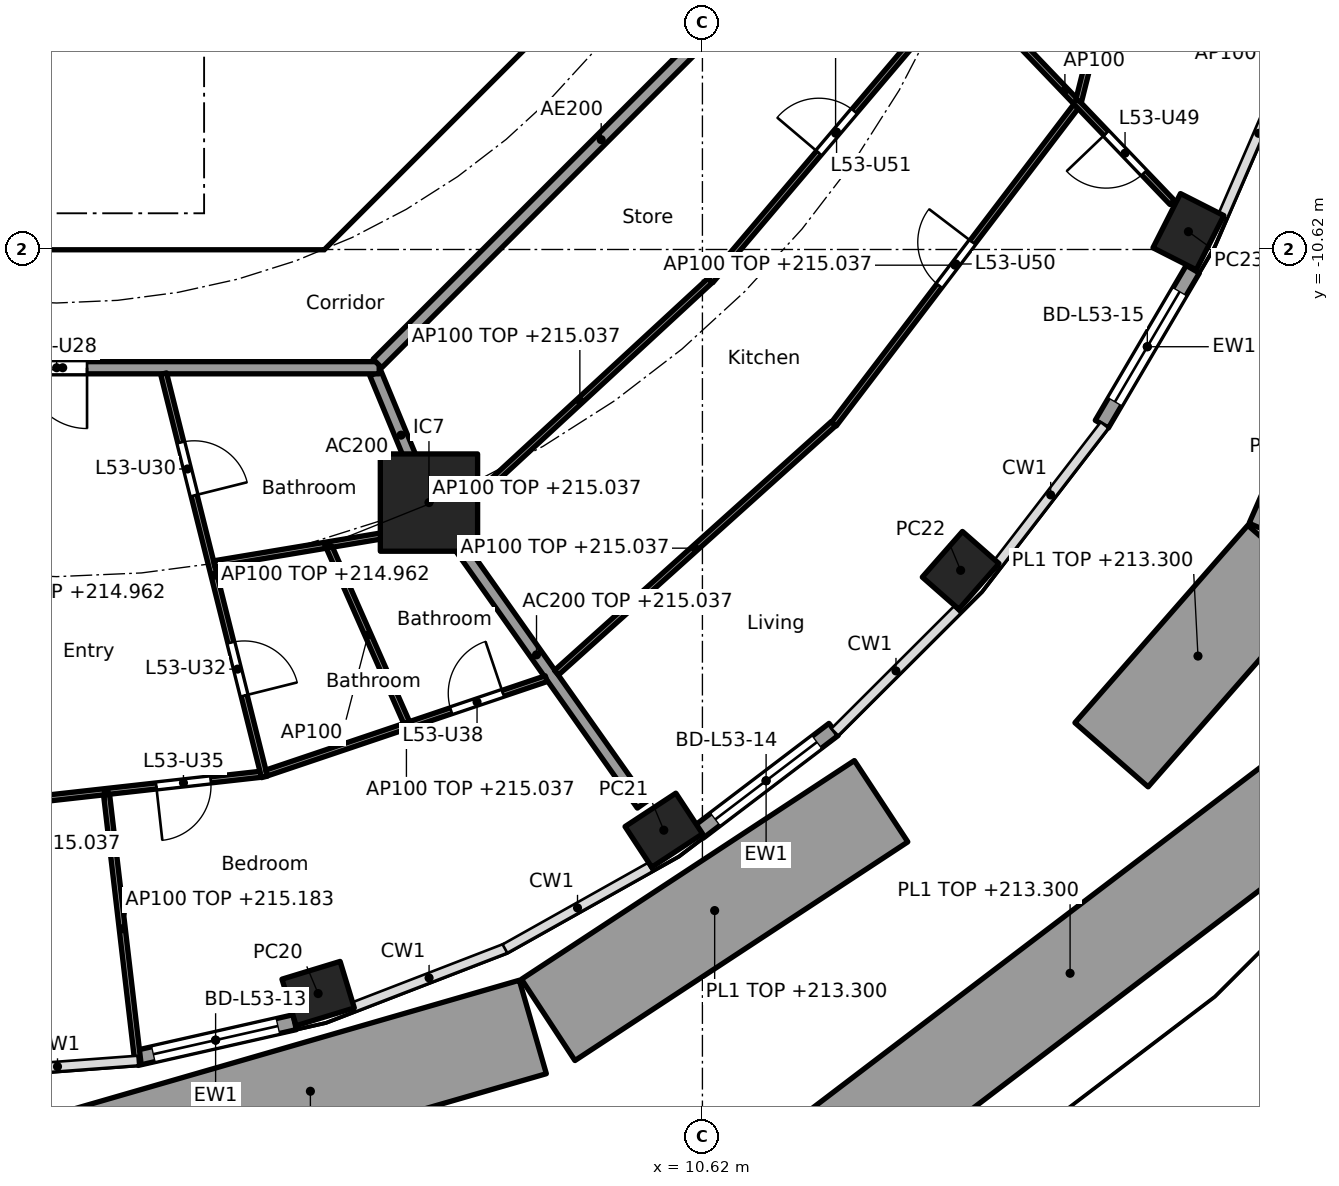
"""IFC4 building model, lengths in metres.
Left out: names, types, materials, properties, quantities, classifications, styles, units other than length and angle.
Written with IfcOpenShell. Run it as: python <this file> out.ifc"""

import sys

from ifc_helpers import new_model, si_unit, direction, frame, frame_2d, origin, origin_2d, place, context, subcontext, project, spatial, polyline, rectangle, hollow_rectangle, outline, extrude, element, fill, save


model = new_model("IFC4")
c1 = context("Model", 3, precision=1e-05, world=origin(), true_north=direction((0.0, 1.0)))
c2 = subcontext(c1, "Body", "Model", "MODEL_VIEW")
j1 = project(units=[si_unit("LENGTHUNIT", "METRE"), si_unit("PLANEANGLEUNIT", "RADIAN")], contexts=[c1])
p1 = place(None, origin())
s1 = spatial("IfcSite", under=j1, at=p1, CompositionType="ELEMENT")
p2 = place(p1, origin())
s2 = spatial("IfcBuilding", under=s1, at=p2, CompositionType="ELEMENT")
p3 = place(p2, frame((0.0, 0.0, 212.2)))
s3 = spatial("IfcBuildingStorey", under=s2, at=p3, CompositionType="ELEMENT", Elevation=212.2)
for number, where, z_axis, x_axis in (
    (1, (4.3, -22.856, -0.26), (0.0, 0.0, 1.0), (0.957, 0.292, 0.0)),
    (2, (9.985, -20.17, -0.26), (0.0, 0.0, 1.0), (0.836, 0.549, 0.0)),
    (3, (14.866, -15.896, -0.26), (0.0, 0.0, 1.0), (0.66, 0.751, 0.0)),
    (4, (18.612, -10.327, -0.26), (0.0, 0.0, 1.0), (0.452, 0.892, 0.0)),
):
    element("IfcColumn", number, at=place(p3, frame(where, z_axis=z_axis, x_axis=x_axis)), inside=s3, PredefinedType="COLUMN", context=c2, shape_type="SweptSolid", body=[
        extrude(hollow_rectangle(XDim=1.0, YDim=0.8, WallThickness=0.032, at=origin_2d()), origin(), (0.0, 0.0, 1.0), 3.96),
    ])
p4 = place(p3, frame((6.123, -14.782, 0.0), z_axis=(0.0, 0.0, 1.0), x_axis=(1.0, 0.0, 0.0)))
e5 = element("IfcColumn", 5, at=p4, inside=s3, PredefinedType="COLUMN", context=c2, shape_type="SweptSolid", body=[
    extrude(rectangle(XDim=1.6, YDim=1.6, at=origin_2d()), origin(), (0.0, 0.0, 1.0), 3.7),
])
p5 = place(p3, frame((3.915, -23.327, 0.0), z_axis=(0.0, 0.0, 1.0), x_axis=(-0.975324089124, -0.220777990694, 0.0)))
e6 = element("IfcWall", 6, at=p5, inside=s3, PredefinedType="SOLIDWALL", context=c2, shape_type="SweptSolid", body=[
    extrude(rectangle(XDim=2.666, YDim=0.25, at=frame_2d((1.333, 0.0))), origin(), (0.0, 0.0, 1.0), 3.44),
])
p6 = place(p5, frame((0.283, 0.0, 0.0)))
e7 = element("IfcOpeningElement", 7, at=p6, cuts=e6, PredefinedType="OPENING", context=c2, shape_type="SweptSolid", body=[
    extrude(rectangle(XDim=2.1, YDim=2.4, at=frame_2d((1.05, 1.2))), frame((0.0, 0.135, 0.0), z_axis=(0.0, -1.0, 0.0), x_axis=(1.0, 0.0, 0.0)), (0.0, 0.0, 1.0), 0.27),
])
p7 = place(p3, frame((12.777, -18.513, 0.0), z_axis=(0.0, 0.0, 1.0), x_axis=(-0.796022158395, -0.605267480825, 0.0)))
e8 = element("IfcWall", 8, at=p7, inside=s3, PredefinedType="SOLIDWALL", context=c2, shape_type="SweptSolid", body=[
    extrude(rectangle(XDim=2.789, YDim=0.25, at=frame_2d((1.395, 0.0))), origin(), (0.0, 0.0, 1.0), 3.44),
])
p8 = place(p7, frame((0.344, 0.0, 0.0)))
e9 = element("IfcOpeningElement", 9, at=p8, cuts=e8, PredefinedType="OPENING", context=c2, shape_type="SweptSolid", body=[
    extrude(rectangle(XDim=2.1, YDim=2.4, at=frame_2d((1.05, 1.2))), frame((0.0, 0.135, 0.0), z_axis=(0.0, -1.0, 0.0), x_axis=(1.0, 0.0, 0.0)), (0.0, 0.0, 1.0), 0.27),
])
p9 = place(p3, frame((18.684, -10.945, 0.0), z_axis=(0.0, 0.0, 1.0), x_axis=(-0.5063555387, -0.862324804484, 0.0)))
e10 = element("IfcWall", 10, at=p9, inside=s3, PredefinedType="SOLIDWALL", context=c2, shape_type="SweptSolid", body=[
    extrude(rectangle(XDim=2.955, YDim=0.25, at=frame_2d((1.477, 0.0))), origin(), (0.0, 0.0, 1.0), 3.44),
])
p10 = place(p9, frame((0.427, 0.0, 0.0)))
e11 = element("IfcOpeningElement", 11, at=p10, cuts=e10, PredefinedType="OPENING", context=c2, shape_type="SweptSolid", body=[
    extrude(rectangle(XDim=2.1, YDim=2.4, at=frame_2d((1.05, 1.2))), frame((0.0, 0.135, 0.0), z_axis=(0.0, -1.0, 0.0), x_axis=(1.0, 0.0, 0.0)), (0.0, 0.0, 1.0), 0.27),
])
p11 = place(p3, frame((0.515, -25.52, 0.0), z_axis=(0.0, 0.0, 1.0), x_axis=(0.960695754533, 0.277603435177, 0.0)))
e12 = element("IfcWall", 12, at=p11, inside=s3, PredefinedType="SOLIDWALL", context=c2, shape_type="SweptSolid", body=[
    extrude(rectangle(XDim=7.615, YDim=1.6, at=frame_2d((3.808, 0.0))), origin(), (0.0, 0.0, 1.0), 1.1),
])
p12 = place(p3, frame((8.084, -23.289, 0.0), z_axis=(0.0, 0.0, 1.0), x_axis=(0.83581006315, 0.549018704907, 0.0)))
e13 = element("IfcWall", 13, at=p12, inside=s3, PredefinedType="SOLIDWALL", context=c2, shape_type="SweptSolid", body=[
    extrude(rectangle(XDim=6.55, YDim=1.6, at=frame_2d((3.275, 0.0))), origin(), (0.0, 0.0, 1.0), 1.1),
])
p13 = place(p3, frame((20.423, -19.665, 0.0), z_axis=(0.0, 0.0, 1.0), x_axis=(-0.795875560639, -0.605460231541, 0.0)))
e14 = element("IfcWall", 14, at=p13, inside=s3, PredefinedType="SOLIDWALL", context=c2, shape_type="SweptSolid", body=[
    extrude(rectangle(XDim=9.44, YDim=1.6, at=frame_2d((4.72, 0.0))), origin(), (0.0, 0.0, 1.0), 1.1),
])
p14 = place(p3, frame((17.348, -18.93, 0.0), z_axis=(0.0, 0.0, 1.0), x_axis=(0.65874885124, 0.752362911759, 0.0)))
e15 = element("IfcWall", 15, at=p14, inside=s3, PredefinedType="SOLIDWALL", context=c2, shape_type="SweptSolid", body=[
    extrude(rectangle(XDim=4.316, YDim=1.6, at=frame_2d((2.158, 0.0))), origin(), (0.0, 0.0, 1.0), 1.1),
])
p15 = place(p3, frame((20.343, -15.443, 0.0), z_axis=(0.0, 0.0, 1.0), x_axis=(0.400883628547, 0.916128984567, 0.0)))
e16 = element("IfcWall", 16, at=p15, inside=s3, PredefinedType="SOLIDWALL", context=c2, shape_type="SweptSolid", body=[
    extrude(rectangle(XDim=6.72, YDim=1.6, at=frame_2d((3.36, 0.0))), origin(), (0.0, 0.0, 1.0), 1.1),
])
p16 = place(p3, frame((4.613, -9.988, 0.0), z_axis=(0.0, 0.0, 1.0), x_axis=(0.707106781187, 0.707106781187, 0.0)))
e17 = element("IfcWall", 17, at=p16, inside=s3, PredefinedType="SHEAR", context=c2, shape_type="SweptSolid", body=[
    extrude(rectangle(XDim=7.602, YDim=0.6, at=frame_2d((3.801, 0.0))), origin(), (0.0, 0.0, 1.0), 3.44),
])
p17 = place(p16, frame((3.201, 0.0, 0.0)))
e18 = element("IfcOpeningElement", 18, at=p17, cuts=e17, PredefinedType="OPENING", context=c2, shape_type="SweptSolid", body=[
    extrude(rectangle(XDim=1.2, YDim=2.1, at=frame_2d((0.6, 1.05))), frame((0.0, 0.31, 0.0), z_axis=(0.0, -1.0, 0.0), x_axis=(1.0, 0.0, 0.0)), (0.0, 0.0, 1.0), 0.62),
])
p18 = place(p3, frame((4.0, -10.025, 0.0), z_axis=(0.0, 0.0, 1.0), x_axis=(0.0, 1.0, 0.0)))
e19 = element("IfcWall", 19, at=p18, inside=s3, PredefinedType="SOLIDWALL", context=c2, shape_type="SweptSolid", body=[
    extrude(rectangle(XDim=3.0, YDim=0.2, at=frame_2d((1.5, 0.0))), origin(), (0.0, 0.0, 1.0), 3.44),
])
p19 = place(p18, frame((0.975, 0.0, 0.0)))
e20 = element("IfcOpeningElement", 20, at=p19, cuts=e19, PredefinedType="OPENING", context=c2, shape_type="SweptSolid", body=[
    extrude(rectangle(XDim=1.1, YDim=2.1, at=frame_2d((0.55, 1.05))), frame((0.0, 0.11, 0.0), z_axis=(0.0, -1.0, 0.0), x_axis=(1.0, 0.0, 0.0)), (0.0, 0.0, 1.0), 0.22),
])
p20 = place(p3, origin())
e21 = element("IfcWall", 21, at=p20, inside=s3, PredefinedType="SHEAR", context=c2, shape_type="SweptSolid", body=[
    extrude(outline(polyline([(-4.152, -10.025), (4.152, -10.025), (4.401, -9.776), (4.825, -10.2), (4.401, -10.625), (-4.401, -10.625), (-4.825, -10.2), (-4.401, -9.776), (-4.152, -10.025)])), origin(), (0.0, 0.0, 1.0), 3.44),
])
p21 = place(p3, frame((5.243, -12.657, 0.0), z_axis=(0.0, 0.0, 1.0), x_axis=(0.382691608661, -0.923876145736, 0.0)))
e22 = element("IfcWall", 22, at=p21, inside=s3, PredefinedType="PARTITIONING", context=c2, shape_type="SweptSolid", body=[
    extrude(rectangle(XDim=2.2, YDim=0.2, at=frame_2d((1.1, 0.0))), origin(), (0.0, 0.0, 1.0), 3.44),
])
p22 = place(p3, frame((6.152, -14.823, 0.0), z_axis=(0.0, 0.0, 1.0), x_axis=(0.576994695158, -0.816747893637, 0.0)))
e23 = element("IfcWall", 23, at=p22, inside=s3, PredefinedType="PARTITIONING", context=c2, shape_type="SweptSolid", body=[
    extrude(rectangle(XDim=6.03, YDim=0.2, at=frame_2d((3.015, 0.0))), origin(), (0.0, 0.0, 1.0), 2.837),
])
p23 = place(p3, frame((-5.104, -12.565, 0.0), z_axis=(0.0, 0.0, 1.0), x_axis=(1.0, 0.0, 0.0)))
e24 = element("IfcWall", 24, at=p23, inside=s3, PredefinedType="PARTITIONING", context=c2, shape_type="SweptSolid", body=[
    extrude(rectangle(XDim=10.409, YDim=0.2, at=frame_2d((5.205, 0.0))), origin(), (0.0, 0.0, 1.0), 3.44),
])
p24 = place(p23, frame((4.604, 0.0, 0.0)))
e25 = element("IfcOpeningElement", 25, at=p24, cuts=e24, PredefinedType="OPENING", context=c2, shape_type="SweptSolid", body=[
    extrude(rectangle(XDim=1.0, YDim=2.1, at=frame_2d((0.5, 1.05))), frame((0.0, 0.11, 0.0), z_axis=(0.0, -1.0, 0.0), x_axis=(1.0, 0.0, 0.0)), (0.0, 0.0, 1.0), 0.22),
])
p25 = place(p3, frame((5.275, -12.494, 0.0), z_axis=(0.0, 0.0, 1.0), x_axis=(0.707106781187, 0.707106781187, 0.0)))
e26 = element("IfcWall", 26, at=p25, inside=s3, PredefinedType="PARTITIONING", context=c2, shape_type="SweptSolid", body=[
    extrude(rectangle(XDim=10.409, YDim=0.2, at=frame_2d((5.205, 0.0))), origin(), (0.0, 0.0, 1.0), 3.44),
])
p26 = place(p3, frame((-1.726, -19.818, 0.0), z_axis=(0.0, 0.0, 1.0), x_axis=(0.99381893047, 0.111013212902, 0.0)))
e27 = element("IfcWall", 27, at=p26, inside=s3, PredefinedType="PARTITIONING", context=c2, shape_type="SweptSolid", body=[
    extrude(rectangle(XDim=5.113, YDim=0.1, at=frame_2d((2.557, 0.0))), origin(), (0.0, 0.0, 1.0), 2.837),
])
p27 = place(p26, frame((3.385, 0.0, 0.0)))
e28 = element("IfcOpeningElement", 28, at=p27, cuts=e27, PredefinedType="OPENING", context=c2, shape_type="SweptSolid", body=[
    extrude(rectangle(XDim=0.9, YDim=2.1, at=frame_2d((0.45, 1.05))), frame((0.0, 0.06, 0.0), z_axis=(0.0, -1.0, 0.0), x_axis=(1.0, 0.0, 0.0)), (0.0, 0.0, 1.0), 0.12),
])
p28 = place(p3, frame((0.821, -19.584, 0.0), z_axis=(0.0, 0.0, 1.0), x_axis=(0.116120946841, -0.993235080786, 0.0)))
e29 = element("IfcWall", 29, at=p28, inside=s3, PredefinedType="PARTITIONING", context=c2, shape_type="SweptSolid", body=[
    extrude(rectangle(XDim=4.445, YDim=0.1, at=frame_2d((2.222, 0.0))), origin(), (0.0, 0.0, 1.0), 2.983),
])
p29 = place(p3, frame((1.759, -12.662, 0.0), z_axis=(0.0, 0.0, 1.0), x_axis=(0.242653275363, -0.970113079984, 0.0)))
e30 = element("IfcWall", 30, at=p29, inside=s3, PredefinedType="PARTITIONING", context=c2, shape_type="SweptSolid", body=[
    extrude(rectangle(XDim=6.836, YDim=0.1, at=frame_2d((3.418, 0.0))), origin(), (0.0, 0.0, 1.0), 2.762),
])
p30 = place(p29, frame((1.166, 0.0, 0.0)))
e31 = element("IfcOpeningElement", 31, at=p30, cuts=e30, PredefinedType="OPENING", context=c2, shape_type="SweptSolid", body=[
    extrude(rectangle(XDim=0.9, YDim=2.1, at=frame_2d((0.45, 1.05))), frame((0.0, 0.06, 0.0), z_axis=(0.0, -1.0, 0.0), x_axis=(1.0, 0.0, 0.0)), (0.0, 0.0, 1.0), 0.12),
])
p31 = place(p29, frame((4.559, 0.0, 0.0)))
e32 = element("IfcOpeningElement", 32, at=p31, cuts=e30, PredefinedType="OPENING", context=c2, shape_type="SweptSolid", body=[
    extrude(rectangle(XDim=0.9, YDim=2.1, at=frame_2d((0.45, 1.05))), frame((0.0, 0.06, 0.0), z_axis=(0.0, -1.0, 0.0), x_axis=(1.0, 0.0, 0.0)), (0.0, 0.0, 1.0), 0.12),
])
p32 = place(p3, frame((2.593, -15.789, 0.0), z_axis=(0.0, 0.0, 1.0), x_axis=(0.986385117656, 0.164451815639, 0.0)))
e33 = element("IfcWall", 33, at=p32, inside=s3, PredefinedType="PARTITIONING", context=c2, shape_type="SweptSolid", body=[
    extrude(rectangle(XDim=3.747, YDim=0.1, at=frame_2d((1.874, 0.0))), origin(), (0.0, 0.0, 1.0), 2.837),
])
p33 = place(p3, frame((3.453, -19.229, 0.0), z_axis=(0.0, 0.0, 1.0), x_axis=(0.947565610716, 0.31956128268, 0.0)))
e34 = element("IfcWall", 34, at=p33, inside=s3, PredefinedType="PARTITIONING", context=c2, shape_type="SweptSolid", body=[
    extrude(rectangle(XDim=4.853, YDim=0.1, at=frame_2d((2.426, 0.0))), origin(), (0.0, 0.0, 1.0), 2.837),
])
p34 = place(p33, frame((3.202, 0.0, 0.0)))
e35 = element("IfcOpeningElement", 35, at=p34, cuts=e34, PredefinedType="OPENING", context=c2, shape_type="SweptSolid", body=[
    extrude(rectangle(XDim=0.9, YDim=2.1, at=frame_2d((0.45, 1.05))), frame((0.0, 0.06, 0.0), z_axis=(0.0, -1.0, 0.0), x_axis=(1.0, 0.0, 0.0)), (0.0, 0.0, 1.0), 0.12),
])
p35 = place(p3, frame((4.485, -15.522, 0.0), z_axis=(0.0, 0.0, 1.0), x_axis=(0.40391918208, -0.914794673327, 0.0)))
e36 = element("IfcWall", 36, at=p35, inside=s3, PredefinedType="PARTITIONING", context=c2, shape_type="SweptSolid", body=[
    extrude(rectangle(XDim=3.146, YDim=0.1, at=frame_2d((1.573, 0.0))), origin(), (0.0, 0.0, 1.0), 3.44),
])
p36 = place(p3, frame((6.461, -15.088, 0.0), z_axis=(0.0, 0.0, 1.0), x_axis=(0.73461579427, 0.678483334217, 0.0)))
e37 = element("IfcWall", 37, at=p36, inside=s3, PredefinedType="PARTITIONING", context=c2, shape_type="SweptSolid", body=[
    extrude(rectangle(XDim=5.837, YDim=0.1, at=frame_2d((2.918, 0.0))), origin(), (0.0, 0.0, 1.0), 2.837),
])
p37 = place(p3, frame((8.22, -17.579, 0.0), z_axis=(0.0, 0.0, 1.0), x_axis=(0.743696370895, 0.668517544958, 0.0)))
e38 = element("IfcWall", 38, at=p37, inside=s3, PredefinedType="PARTITIONING", context=c2, shape_type="SweptSolid", body=[
    extrude(rectangle(XDim=6.125, YDim=0.1, at=frame_2d((3.062, 0.0))), origin(), (0.0, 0.0, 1.0), 2.837),
])
p38 = place(p3, frame((10.753, -11.132, 0.0), z_axis=(0.0, 0.0, 1.0), x_axis=(0.647001799757, 0.762488472773, 0.0)))
e39 = element("IfcWall", 39, at=p38, inside=s3, PredefinedType="PARTITIONING", context=c2, shape_type="SweptSolid", body=[
    extrude(rectangle(XDim=6.359, YDim=0.1, at=frame_2d((3.179, 0.0))), origin(), (0.0, 0.0, 1.0), 2.837),
])
p39 = place(p38, frame((2.754, 0.0, 0.0)))
e40 = element("IfcOpeningElement", 40, at=p39, cuts=e39, PredefinedType="OPENING", context=c2, shape_type="SweptSolid", body=[
    extrude(rectangle(XDim=0.9, YDim=2.1, at=frame_2d((0.45, 1.05))), frame((0.0, 0.06, 0.0), z_axis=(0.0, -1.0, 0.0), x_axis=(1.0, 0.0, 0.0)), (0.0, 0.0, 1.0), 0.12),
])
p40 = place(p3, frame((12.782, -13.491, 0.0), z_axis=(0.0, 0.0, 1.0), x_axis=(0.606136140755, 0.795360911078, 0.0)))
e41 = element("IfcWall", 41, at=p40, inside=s3, PredefinedType="PARTITIONING", context=c2, shape_type="SweptSolid", body=[
    extrude(rectangle(XDim=6.57, YDim=0.1, at=frame_2d((3.285, 0.0))), origin(), (0.0, 0.0, 1.0), 2.837),
])
p41 = place(p40, frame((2.86, 0.0, 0.0)))
e42 = element("IfcOpeningElement", 42, at=p41, cuts=e41, PredefinedType="OPENING", context=c2, shape_type="SweptSolid", body=[
    extrude(rectangle(XDim=0.9, YDim=2.1, at=frame_2d((0.45, 1.05))), frame((0.0, 0.06, 0.0), z_axis=(0.0, -1.0, 0.0), x_axis=(1.0, 0.0, 0.0)), (0.0, 0.0, 1.0), 0.12),
])
p42 = place(p3, frame((14.817, -6.159, 0.0), z_axis=(0.0, 0.0, 1.0), x_axis=(0.691437669875, -0.722436120828, 0.0)))
e43 = element("IfcWall", 43, at=p42, inside=s3, PredefinedType="PARTITIONING", context=c2, shape_type="SweptSolid", body=[
    extrude(rectangle(XDim=5.104, YDim=0.1, at=frame_2d((2.552, 0.0))), origin(), (0.0, 0.0, 1.0), 3.44),
])
p43 = place(p42, frame((3.532, 0.0, 0.0)))
e44 = element("IfcOpeningElement", 44, at=p43, cuts=e43, PredefinedType="OPENING", context=c2, shape_type="SweptSolid", body=[
    extrude(rectangle(XDim=0.9, YDim=2.1, at=frame_2d((0.45, 1.05))), frame((0.0, 0.06, 0.0), z_axis=(0.0, -1.0, 0.0), x_axis=(1.0, 0.0, 0.0)), (0.0, 0.0, 1.0), 0.12),
])
p44 = place(p3, frame((16.807, -8.177, 0.0), z_axis=(0.0, 0.0, 1.0), x_axis=(0.243002985225, 0.970025540474, 0.0)))
e45 = element("IfcWall", 45, at=p44, inside=s3, PredefinedType="PARTITIONING", context=c2, shape_type="SweptSolid", body=[
    extrude(rectangle(XDim=5.162, YDim=0.1, at=frame_2d((2.581, 0.0))), origin(), (0.0, 0.0, 1.0), 2.837),
])
p45 = place(p44, frame((2.844, 0.0, 0.0)))
e46 = element("IfcOpeningElement", 46, at=p45, cuts=e45, PredefinedType="OPENING", context=c2, shape_type="SweptSolid", body=[
    extrude(rectangle(XDim=0.9, YDim=2.1, at=frame_2d((0.45, 1.05))), frame((0.0, 0.06, 0.0), z_axis=(0.0, -1.0, 0.0), x_axis=(1.0, 0.0, 0.0)), (0.0, 0.0, 1.0), 0.12),
])
p46 = place(p6, origin())
e47 = element("IfcDoor", 47, at=p46, inside=s3, OperationType="SLIDING_TO_LEFT", PredefinedType="DOOR", context=c2, shape_type="SweptSolid", body=[
    extrude(rectangle(XDim=2.1, YDim=2.4, at=frame_2d((1.05, 1.2))), frame((0.0, 0.025, 0.0), z_axis=(0.0, -1.0, 0.0), x_axis=(1.0, 0.0, 0.0)), (0.0, 0.0, 1.0), 0.05),
])
fill(e7, e47)
p47 = place(p8, origin())
e48 = element("IfcDoor", 48, at=p47, inside=s3, OperationType="SLIDING_TO_LEFT", PredefinedType="DOOR", context=c2, shape_type="SweptSolid", body=[
    extrude(rectangle(XDim=2.1, YDim=2.4, at=frame_2d((1.05, 1.2))), frame((0.0, 0.025, 0.0), z_axis=(0.0, -1.0, 0.0), x_axis=(1.0, 0.0, 0.0)), (0.0, 0.0, 1.0), 0.05),
])
fill(e9, e48)
p48 = place(p10, origin())
e49 = element("IfcDoor", 49, at=p48, inside=s3, OperationType="SLIDING_TO_LEFT", PredefinedType="DOOR", context=c2, shape_type="SweptSolid", body=[
    extrude(rectangle(XDim=2.1, YDim=2.4, at=frame_2d((1.05, 1.2))), frame((0.0, 0.025, 0.0), z_axis=(0.0, -1.0, 0.0), x_axis=(1.0, 0.0, 0.0)), (0.0, 0.0, 1.0), 0.05),
])
fill(e11, e49)
p49 = place(p19, origin())
e50 = element("IfcDoor", 50, at=p49, inside=s3, OperationType="SINGLE_SWING_LEFT", PredefinedType="DOOR", context=c2, shape_type="SweptSolid", body=[
    extrude(rectangle(XDim=1.1, YDim=2.1, at=frame_2d((0.55, 1.05))), frame((0.0, 0.025, 0.0), z_axis=(0.0, -1.0, 0.0), x_axis=(1.0, 0.0, 0.0)), (0.0, 0.0, 1.0), 0.05),
])
fill(e20, e50)
p50 = place(p17, origin())
e51 = element("IfcDoor", 51, at=p50, inside=s3, OperationType="SINGLE_SWING_LEFT", PredefinedType="DOOR", context=c2, shape_type="SweptSolid", body=[
    extrude(rectangle(XDim=1.2, YDim=2.1, at=frame_2d((0.6, 1.05))), frame((0.0, 0.025, 0.0), z_axis=(0.0, -1.0, 0.0), x_axis=(1.0, 0.0, 0.0)), (0.0, 0.0, 1.0), 0.05),
])
fill(e18, e51)
p51 = place(p24, frame((1.0, 0.0, 0.0), x_axis=(-1.0, 0.0, 0.0)))
e52 = element("IfcDoor", 52, at=p51, inside=s3, OperationType="SINGLE_SWING_LEFT", PredefinedType="DOOR", context=c2, shape_type="SweptSolid", body=[
    extrude(rectangle(XDim=1.0, YDim=2.1, at=frame_2d((0.5, 1.05))), frame((0.0, 0.025, 0.0), z_axis=(0.0, -1.0, 0.0), x_axis=(1.0, 0.0, 0.0)), (0.0, 0.0, 1.0), 0.05),
])
fill(e25, e52)
p52 = place(p30, origin())
e53 = element("IfcDoor", 53, at=p52, inside=s3, OperationType="SINGLE_SWING_RIGHT", PredefinedType="DOOR", context=c2, shape_type="SweptSolid", body=[
    extrude(rectangle(XDim=0.9, YDim=2.1, at=frame_2d((0.45, 1.05))), frame((0.0, 0.025, 0.0), z_axis=(0.0, -1.0, 0.0), x_axis=(1.0, 0.0, 0.0)), (0.0, 0.0, 1.0), 0.05),
])
fill(e31, e53)
p53 = place(p31, origin())
e54 = element("IfcDoor", 54, at=p53, inside=s3, OperationType="SINGLE_SWING_RIGHT", PredefinedType="DOOR", context=c2, shape_type="SweptSolid", body=[
    extrude(rectangle(XDim=0.9, YDim=2.1, at=frame_2d((0.45, 1.05))), frame((0.0, 0.025, 0.0), z_axis=(0.0, -1.0, 0.0), x_axis=(1.0, 0.0, 0.0)), (0.0, 0.0, 1.0), 0.05),
])
fill(e32, e54)
p54 = place(p27, frame((0.9, 0.0, 0.0), x_axis=(-1.0, 0.0, 0.0)))
e55 = element("IfcDoor", 55, at=p54, inside=s3, OperationType="SINGLE_SWING_RIGHT", PredefinedType="DOOR", context=c2, shape_type="SweptSolid", body=[
    extrude(rectangle(XDim=0.9, YDim=2.1, at=frame_2d((0.45, 1.05))), frame((0.0, 0.025, 0.0), z_axis=(0.0, -1.0, 0.0), x_axis=(1.0, 0.0, 0.0)), (0.0, 0.0, 1.0), 0.05),
])
fill(e28, e55)
p55 = place(p34, origin())
e56 = element("IfcDoor", 56, at=p55, inside=s3, OperationType="SINGLE_SWING_RIGHT", PredefinedType="DOOR", context=c2, shape_type="SweptSolid", body=[
    extrude(rectangle(XDim=0.9, YDim=2.1, at=frame_2d((0.45, 1.05))), frame((0.0, 0.025, 0.0), z_axis=(0.0, -1.0, 0.0), x_axis=(1.0, 0.0, 0.0)), (0.0, 0.0, 1.0), 0.05),
])
fill(e35, e56)
p56 = place(p43, frame((0.9, 0.0, 0.0), x_axis=(-1.0, 0.0, 0.0)))
e57 = element("IfcDoor", 57, at=p56, inside=s3, OperationType="SINGLE_SWING_RIGHT", PredefinedType="DOOR", context=c2, shape_type="SweptSolid", body=[
    extrude(rectangle(XDim=0.9, YDim=2.1, at=frame_2d((0.45, 1.05))), frame((0.0, 0.025, 0.0), z_axis=(0.0, -1.0, 0.0), x_axis=(1.0, 0.0, 0.0)), (0.0, 0.0, 1.0), 0.05),
])
fill(e44, e57)
p57 = place(p41, origin())
e58 = element("IfcDoor", 58, at=p57, inside=s3, OperationType="SINGLE_SWING_RIGHT", PredefinedType="DOOR", context=c2, shape_type="SweptSolid", body=[
    extrude(rectangle(XDim=0.9, YDim=2.1, at=frame_2d((0.45, 1.05))), frame((0.0, 0.025, 0.0), z_axis=(0.0, -1.0, 0.0), x_axis=(1.0, 0.0, 0.0)), (0.0, 0.0, 1.0), 0.05),
])
fill(e42, e58)
p58 = place(p39, origin())
e59 = element("IfcDoor", 59, at=p58, inside=s3, OperationType="SINGLE_SWING_LEFT", PredefinedType="DOOR", context=c2, shape_type="SweptSolid", body=[
    extrude(rectangle(XDim=0.9, YDim=2.1, at=frame_2d((0.45, 1.05))), frame((0.0, 0.025, 0.0), z_axis=(0.0, -1.0, 0.0), x_axis=(1.0, 0.0, 0.0)), (0.0, 0.0, 1.0), 0.05),
])
fill(e40, e59)
save(model, sys.argv[1])
